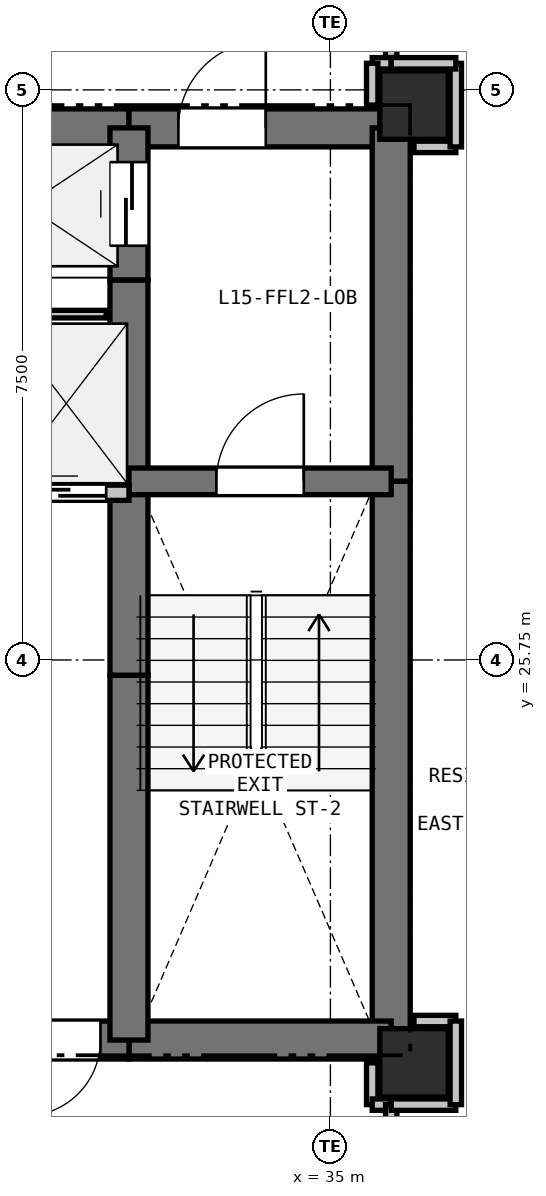
"""IFC4 building model, lengths in metres.
Left out: names, types, materials, properties, quantities, classifications, styles, units other than length and angle.
Written with IfcOpenShell. Run it as: python <this file> out.ifc"""

import sys

from ifc_helpers import new_model, si_unit, direction, frame, frame_2d, origin, origin_2d, place, context, subcontext, project, spatial, rectangle, extrude, element, fill, save


model = new_model("IFC4")
c1 = context("Model", 3, precision=1e-05, world=origin(), true_north=direction((0.0, 1.0)))
c2 = subcontext(c1, "Body", "Model", "MODEL_VIEW")
j1 = project(units=[si_unit("LENGTHUNIT", "METRE"), si_unit("PLANEANGLEUNIT", "RADIAN")], contexts=[c1])
p1 = place(None, origin())
s1 = spatial("IfcSite", under=j1, at=p1, CompositionType="ELEMENT")
p2 = place(p1, origin())
s2 = spatial("IfcBuilding", under=s1, at=p2, CompositionType="ELEMENT")
p3 = place(p2, frame((0.0, 0.0, 55.5)))
s3 = spatial("IfcBuildingStorey", under=s2, at=p3, CompositionType="ELEMENT", Elevation=55.5)
for number, where, z_axis, x_axis in (
    (1, (36.1, 33.05, 0.0), (0.0, 0.0, 1.0), (1.0, 0.0, 0.0)),
    (2, (36.1, 20.45, 0.0), (0.0, 0.0, 1.0), (1.0, 0.0, 0.0)),
):
    element("IfcColumn", number, at=place(p3, frame(where, z_axis=z_axis, x_axis=x_axis)), inside=s3, PredefinedType="COLUMN", context=c2, shape_type="SweptSolid", body=[
        extrude(rectangle(XDim=0.9, YDim=0.9, at=origin_2d()), origin(), (0.0, 0.0, 1.0), 3.3),
    ])
p4 = place(p3, frame((29.65, 32.75, 0.0), z_axis=(0.0, 0.0, 1.0), x_axis=(1.0, 0.0, 0.0)))
e3 = element("IfcWall", 3, at=p4, inside=s3, PredefinedType="SHEAR", context=c2, shape_type="SweptSolid", body=[
    extrude(rectangle(XDim=2.7, YDim=0.5, at=frame_2d((1.35, 0.0))), origin(), (0.0, 0.0, 1.0), 3.04),
])
p5 = place(p3, frame((32.35, 32.75, 0.0), z_axis=(0.0, 0.0, 1.0), x_axis=(1.0, 0.0, 0.0)))
e4 = element("IfcWall", 4, at=p5, inside=s3, PredefinedType="SHEAR", context=c2, shape_type="SweptSolid", body=[
    extrude(rectangle(XDim=3.45, YDim=0.5, at=frame_2d((1.725, 0.0))), origin(), (0.0, 0.0, 1.0), 3.04),
])
p6 = place(p5, frame((0.65, 0.0, 0.0)))
e5 = element("IfcOpeningElement", 5, at=p6, cuts=e4, PredefinedType="OPENING", context=c2, shape_type="SweptSolid", body=[
    extrude(rectangle(XDim=1.15, YDim=2.15, at=frame_2d((0.575, 1.075))), frame((0.0, 0.26, 0.0), z_axis=(0.0, -1.0, 0.0), x_axis=(1.0, 0.0, 0.0)), (0.0, 0.0, 1.0), 0.52),
])
p7 = place(p3, frame((35.8, 32.75, 0.0), z_axis=(0.0, 0.0, 1.0), x_axis=(0.0, -1.0, 0.0)))
e6 = element("IfcWall", 6, at=p7, inside=s3, PredefinedType="SHEAR", context=c2, shape_type="SweptSolid", body=[
    extrude(rectangle(XDim=4.65, YDim=0.5, at=frame_2d((2.325, 0.0))), origin(), (0.0, 0.0, 1.0), 3.04),
])
p8 = place(p3, frame((35.8, 28.1, 0.0), z_axis=(0.0, 0.0, 1.0), x_axis=(0.0, -1.0, 0.0)))
e7 = element("IfcWall", 7, at=p8, inside=s3, PredefinedType="SHEAR", context=c2, shape_type="SweptSolid", body=[
    extrude(rectangle(XDim=7.35, YDim=0.5, at=frame_2d((3.675, 0.0))), origin(), (0.0, 0.0, 1.0), 3.04),
])
p9 = place(p3, frame((35.8, 20.75, 0.0), z_axis=(0.0, 0.0, 1.0), x_axis=(-1.0, 0.0, 0.0)))
e8 = element("IfcWall", 8, at=p9, inside=s3, PredefinedType="SHEAR", context=c2, shape_type="SweptSolid", body=[
    extrude(rectangle(XDim=3.45, YDim=0.5, at=frame_2d((1.725, 0.0))), origin(), (0.0, 0.0, 1.0), 3.04),
])
p10 = place(p3, frame((32.35, 20.75, 0.0), z_axis=(0.0, 0.0, 1.0), x_axis=(-1.0, 0.0, 0.0)))
e9 = element("IfcWall", 9, at=p10, inside=s3, PredefinedType="SHEAR", context=c2, shape_type="SweptSolid", body=[
    extrude(rectangle(XDim=1.75, YDim=0.5, at=frame_2d((0.875, 0.0))), origin(), (0.0, 0.0, 1.0), 3.04),
])
p11 = place(p10, frame((0.375, 0.0, 0.0)))
e10 = element("IfcOpeningElement", 10, at=p11, cuts=e9, PredefinedType="OPENING", context=c2, shape_type="SweptSolid", body=[
    extrude(rectangle(XDim=1.0, YDim=2.15, at=frame_2d((0.5, 1.075))), frame((0.0, 0.26, 0.0), z_axis=(0.0, -1.0, 0.0), x_axis=(1.0, 0.0, 0.0)), (0.0, 0.0, 1.0), 0.52),
])
p12 = place(p3, frame((32.35, 20.75, 0.0), z_axis=(0.0, 0.0, 1.0), x_axis=(0.0, 1.0, 0.0)))
e11 = element("IfcWall", 11, at=p12, inside=s3, PredefinedType="SHEAR", context=c2, shape_type="SweptSolid", body=[
    extrude(rectangle(XDim=4.8, YDim=0.5, at=frame_2d((2.4, 0.0))), origin(), (0.0, 0.0, 1.0), 3.04),
])
p13 = place(p3, frame((32.35, 25.55, 0.0), z_axis=(0.0, 0.0, 1.0), x_axis=(0.0, 1.0, 0.0)))
e12 = element("IfcWall", 12, at=p13, inside=s3, PredefinedType="SHEAR", context=c2, shape_type="SweptSolid", body=[
    extrude(rectangle(XDim=2.4, YDim=0.5, at=frame_2d((1.2, 0.0))), origin(), (0.0, 0.0, 1.0), 3.04),
])
p14 = place(p3, frame((32.35, 27.95, 0.0), z_axis=(0.0, 0.0, 1.0), x_axis=(0.0, 1.0, 0.0)))
e13 = element("IfcWall", 13, at=p14, inside=s3, PredefinedType="SHEAR", context=c2, shape_type="SweptSolid", body=[
    extrude(rectangle(XDim=2.8, YDim=0.5, at=frame_2d((1.4, 0.0))), origin(), (0.0, 0.0, 1.0), 3.04),
])
p15 = place(p3, frame((32.35, 30.75, 0.0), z_axis=(0.0, 0.0, 1.0), x_axis=(0.0, 1.0, 0.0)))
e14 = element("IfcWall", 14, at=p15, inside=s3, PredefinedType="SHEAR", context=c2, shape_type="SweptSolid", body=[
    extrude(rectangle(XDim=2.0, YDim=0.5, at=frame_2d((1.0, 0.0))), origin(), (0.0, 0.0, 1.0), 3.04),
])
p16 = place(p15, frame((0.45, 0.0, 0.0)))
e15 = element("IfcOpeningElement", 15, at=p16, cuts=e14, PredefinedType="OPENING", context=c2, shape_type="SweptSolid", body=[
    extrude(rectangle(XDim=1.1, YDim=2.15, at=frame_2d((0.55, 1.075))), frame((0.0, 0.26, 0.0), z_axis=(0.0, -1.0, 0.0), x_axis=(1.0, 0.0, 0.0)), (0.0, 0.0, 1.0), 0.52),
])
p17 = place(p3, frame((32.35, 28.1, 0.0), z_axis=(0.0, 0.0, 1.0), x_axis=(1.0, 0.0, 0.0)))
e16 = element("IfcWall", 16, at=p17, inside=s3, PredefinedType="SHEAR", context=c2, shape_type="SweptSolid", body=[
    extrude(rectangle(XDim=3.45, YDim=0.35, at=frame_2d((1.725, 0.0))), origin(), (0.0, 0.0, 1.0), 3.04),
])
p18 = place(p17, frame((1.15, 0.0, 0.0)))
e17 = element("IfcOpeningElement", 17, at=p18, cuts=e16, PredefinedType="OPENING", context=c2, shape_type="SweptSolid", body=[
    extrude(rectangle(XDim=1.15, YDim=2.15, at=frame_2d((0.575, 1.075))), frame((0.0, 0.185, 0.0), z_axis=(0.0, -1.0, 0.0), x_axis=(1.0, 0.0, 0.0)), (0.0, 0.0, 1.0), 0.37),
])
p19 = place(p3, frame((27.4, 27.95, 0.0), z_axis=(0.0, 0.0, 1.0), x_axis=(1.0, 0.0, 0.0)))
e18 = element("IfcWall", 18, at=p19, inside=s3, PredefinedType="PARTITIONING", context=c2, shape_type="SweptSolid", body=[
    extrude(rectangle(XDim=4.95, YDim=0.2, at=frame_2d((2.475, 0.0))), origin(), (0.0, 0.0, 1.0), 3.04),
])
p20 = place(p19, frame((0.25, 0.0, 0.0)))
e19 = element("IfcOpeningElement", 19, at=p20, cuts=e18, PredefinedType="OPENING", context=c2, shape_type="SweptSolid", body=[
    extrude(rectangle(XDim=1.1, YDim=2.15, at=frame_2d((0.55, 1.075))), frame((0.0, 0.11, 0.0), z_axis=(0.0, -1.0, 0.0), x_axis=(1.0, 0.0, 0.0)), (0.0, 0.0, 1.0), 0.22),
])
p21 = place(p19, frame((1.9, 0.0, 0.0)))
e20 = element("IfcOpeningElement", 20, at=p21, cuts=e18, PredefinedType="OPENING", context=c2, shape_type="SweptSolid", body=[
    extrude(rectangle(XDim=1.1, YDim=2.15, at=frame_2d((0.55, 1.075))), frame((0.0, 0.11, 0.0), z_axis=(0.0, -1.0, 0.0), x_axis=(1.0, 0.0, 0.0)), (0.0, 0.0, 1.0), 0.22),
])
p22 = place(p19, frame((3.55, 0.0, 0.0)))
e21 = element("IfcOpeningElement", 21, at=p22, cuts=e18, PredefinedType="OPENING", context=c2, shape_type="SweptSolid", body=[
    extrude(rectangle(XDim=1.1, YDim=2.15, at=frame_2d((0.55, 1.075))), frame((0.0, 0.11, 0.0), z_axis=(0.0, -1.0, 0.0), x_axis=(1.0, 0.0, 0.0)), (0.0, 0.0, 1.0), 0.22),
])
p23 = place(p3, frame((32.05, 30.3, 0.0), z_axis=(0.0, 0.0, 1.0), x_axis=(-1.0, 0.0, 0.0)))
e22 = element("IfcWall", 22, at=p23, inside=s3, PredefinedType="PARTITIONING", context=c2, shape_type="SweptSolid", body=[
    extrude(rectangle(XDim=1.35, YDim=0.1, at=frame_2d((0.675, 0.0))), origin(), (0.0, 0.0, 1.0), 3.04),
])
p24 = place(p3, frame((35.55, 20.45, 0.0), z_axis=(0.0, 0.0, 1.0), x_axis=(0.0, -1.0, 0.0)))
e23 = element("IfcWall", 23, at=p24, inside=s3, PredefinedType="PARTITIONING", context=c2, shape_type="SweptSolid", body=[
    extrude(rectangle(XDim=0.55, YDim=0.15, at=frame_2d((0.275, 0.0))), origin(), (0.0, 0.0, 1.0), 2.488),
])
p25 = place(p3, frame((35.55, 19.9, 0.0), z_axis=(0.0, 0.0, 1.0), x_axis=(1.0, 0.0, 0.0)))
e24 = element("IfcWall", 24, at=p25, inside=s3, PredefinedType="PARTITIONING", context=c2, shape_type="SweptSolid", body=[
    extrude(rectangle(XDim=0.25, YDim=0.15, at=frame_2d((0.125, 0.0))), origin(), (0.0, 0.0, 1.0), 3.04),
])
p26 = place(p3, frame((35.8, 19.9, 0.0), z_axis=(0.0, 0.0, 1.0), x_axis=(0.0, -1.0, 0.0)))
e25 = element("IfcWall", 25, at=p26, inside=s3, PredefinedType="PARTITIONING", context=c2, shape_type="SweptSolid", body=[
    extrude(rectangle(XDim=1.75, YDim=0.15, at=frame_2d((0.875, 0.0))), origin(), (0.0, 0.0, 1.0), 3.04),
])
p27 = place(p26, frame((0.375, 0.0, 0.0)))
e26 = element("IfcOpeningElement", 26, at=p27, cuts=e25, PredefinedType="OPENING", context=c2, shape_type="SweptSolid", body=[
    extrude(rectangle(XDim=1.0, YDim=2.15, at=frame_2d((0.5, 1.075))), frame((0.0, 0.085, 0.0), z_axis=(0.0, -1.0, 0.0), x_axis=(1.0, 0.0, 0.0)), (0.0, 0.0, 1.0), 0.17),
])
p28 = place(p3, frame((35.8, 35.35, 0.0), z_axis=(0.0, 0.0, 1.0), x_axis=(0.0, -1.0, 0.0)))
e27 = element("IfcWall", 27, at=p28, inside=s3, PredefinedType="PARTITIONING", context=c2, shape_type="SweptSolid", body=[
    extrude(rectangle(XDim=1.75, YDim=0.15, at=frame_2d((0.875, 0.0))), origin(), (0.0, 0.0, 1.0), 3.04),
])
p29 = place(p28, frame((0.375, 0.0, 0.0)))
e28 = element("IfcOpeningElement", 28, at=p29, cuts=e27, PredefinedType="OPENING", context=c2, shape_type="SweptSolid", body=[
    extrude(rectangle(XDim=1.0, YDim=2.15, at=frame_2d((0.5, 1.075))), frame((0.0, 0.085, 0.0), z_axis=(0.0, -1.0, 0.0), x_axis=(1.0, 0.0, 0.0)), (0.0, 0.0, 1.0), 0.17),
])
p30 = place(p3, frame((35.8, 33.6, 0.0), z_axis=(0.0, 0.0, 1.0), x_axis=(-1.0, 0.0, 0.0)))
e29 = element("IfcWall", 29, at=p30, inside=s3, PredefinedType="PARTITIONING", context=c2, shape_type="SweptSolid", body=[
    extrude(rectangle(XDim=0.25, YDim=0.15, at=frame_2d((0.125, 0.0))), origin(), (0.0, 0.0, 1.0), 3.04),
])
p31 = place(p3, frame((35.55, 33.6, 0.0), z_axis=(0.0, 0.0, 1.0), x_axis=(0.0, -1.0, 0.0)))
e30 = element("IfcWall", 30, at=p31, inside=s3, PredefinedType="PARTITIONING", context=c2, shape_type="SweptSolid", body=[
    extrude(rectangle(XDim=0.55, YDim=0.15, at=frame_2d((0.275, 0.0))), origin(), (0.0, 0.0, 1.0), 2.488),
])
for number, where, z_axis, x_axis in (
    (31, (36.65, 21.0, 0.0), (0.0, 0.0, 1.0), (-1.0, 0.0, 0.0)),
    (32, (36.1, 32.5, 0.0), (0.0, 0.0, 1.0), (1.0, 0.0, 0.0)),
):
    element("IfcWall", number, at=place(p3, frame(where, z_axis=z_axis, x_axis=x_axis)), inside=s3, PredefinedType="PARTITIONING", context=c2, shape_type="SweptSolid", body=[
        extrude(rectangle(XDim=0.55, YDim=0.15, at=frame_2d((0.275, 0.0))), origin(), (0.0, 0.0, 1.0), 2.488),
    ])
p32 = place(p3, frame((36.65, 32.5, 0.0), z_axis=(0.0, 0.0, 1.0), x_axis=(0.0, 1.0, 0.0)))
e33 = element("IfcWall", 33, at=p32, inside=s3, PredefinedType="PARTITIONING", context=c2, shape_type="SweptSolid", body=[
    extrude(rectangle(XDim=1.1, YDim=0.15, at=frame_2d((0.55, 0.0))), origin(), (0.0, 0.0, 1.0), 2.337),
])
for number, where, z_axis, x_axis in (
    (34, (36.65, 33.6, 0.0), (0.0, 0.0, 1.0), (-1.0, 0.0, 0.0)),
    (35, (35.8, 19.9, 0.0), (0.0, 0.0, 1.0), (1.0, 0.0, 0.0)),
):
    element("IfcWall", number, at=place(p3, frame(where, z_axis=z_axis, x_axis=x_axis)), inside=s3, PredefinedType="PARTITIONING", context=c2, shape_type="SweptSolid", body=[
        extrude(rectangle(XDim=0.85, YDim=0.15, at=frame_2d((0.425, 0.0))), origin(), (0.0, 0.0, 1.0), 2.337),
    ])
p33 = place(p3, frame((36.65, 19.9, 0.0), z_axis=(0.0, 0.0, 1.0), x_axis=(0.0, 1.0, 0.0)))
e36 = element("IfcWall", 36, at=p33, inside=s3, PredefinedType="PARTITIONING", context=c2, shape_type="SweptSolid", body=[
    extrude(rectangle(XDim=1.1, YDim=0.15, at=frame_2d((0.55, 0.0))), origin(), (0.0, 0.0, 1.0), 3.04),
])
p34 = place(p22, origin())
e37 = element("IfcDoor", 37, at=p34, inside=s3, OperationType="SLIDING_TO_LEFT", PredefinedType="DOOR", context=c2, shape_type="SweptSolid", body=[
    extrude(rectangle(XDim=1.1, YDim=2.15, at=frame_2d((0.55, 1.075))), frame((0.0, 0.025, 0.0), z_axis=(0.0, -1.0, 0.0), x_axis=(1.0, 0.0, 0.0)), (0.0, 0.0, 1.0), 0.05),
])
fill(e21, e37)
p35 = place(p11, origin())
e38 = element("IfcDoor", 38, at=p35, inside=s3, OperationType="SINGLE_SWING_RIGHT", PredefinedType="DOOR", context=c2, shape_type="SweptSolid", body=[
    extrude(rectangle(XDim=1.0, YDim=2.15, at=frame_2d((0.5, 1.075))), frame((0.0, 0.025, 0.0), z_axis=(0.0, -1.0, 0.0), x_axis=(1.0, 0.0, 0.0)), (0.0, 0.0, 1.0), 0.05),
])
fill(e10, e38)
p36 = place(p16, origin())
e39 = element("IfcDoor", 39, at=p36, inside=s3, OperationType="SLIDING_TO_LEFT", PredefinedType="DOOR", context=c2, shape_type="SweptSolid", body=[
    extrude(rectangle(XDim=1.1, YDim=2.15, at=frame_2d((0.55, 1.075))), frame((0.0, 0.025, 0.0), z_axis=(0.0, -1.0, 0.0), x_axis=(1.0, 0.0, 0.0)), (0.0, 0.0, 1.0), 0.05),
])
fill(e15, e39)
p37 = place(p18, origin())
e40 = element("IfcDoor", 40, at=p37, inside=s3, OperationType="SINGLE_SWING_RIGHT", PredefinedType="DOOR", context=c2, shape_type="SweptSolid", body=[
    extrude(rectangle(XDim=1.15, YDim=2.15, at=frame_2d((0.575, 1.075))), frame((0.0, 0.025, 0.0), z_axis=(0.0, -1.0, 0.0), x_axis=(1.0, 0.0, 0.0)), (0.0, 0.0, 1.0), 0.05),
])
fill(e17, e40)
p38 = place(p6, origin())
e41 = element("IfcDoor", 41, at=p38, inside=s3, OperationType="SINGLE_SWING_RIGHT", PredefinedType="DOOR", context=c2, shape_type="SweptSolid", body=[
    extrude(rectangle(XDim=1.15, YDim=2.15, at=frame_2d((0.575, 1.075))), frame((0.0, 0.025, 0.0), z_axis=(0.0, -1.0, 0.0), x_axis=(1.0, 0.0, 0.0)), (0.0, 0.0, 1.0), 0.05),
])
fill(e5, e41)
save(model, sys.argv[1])
